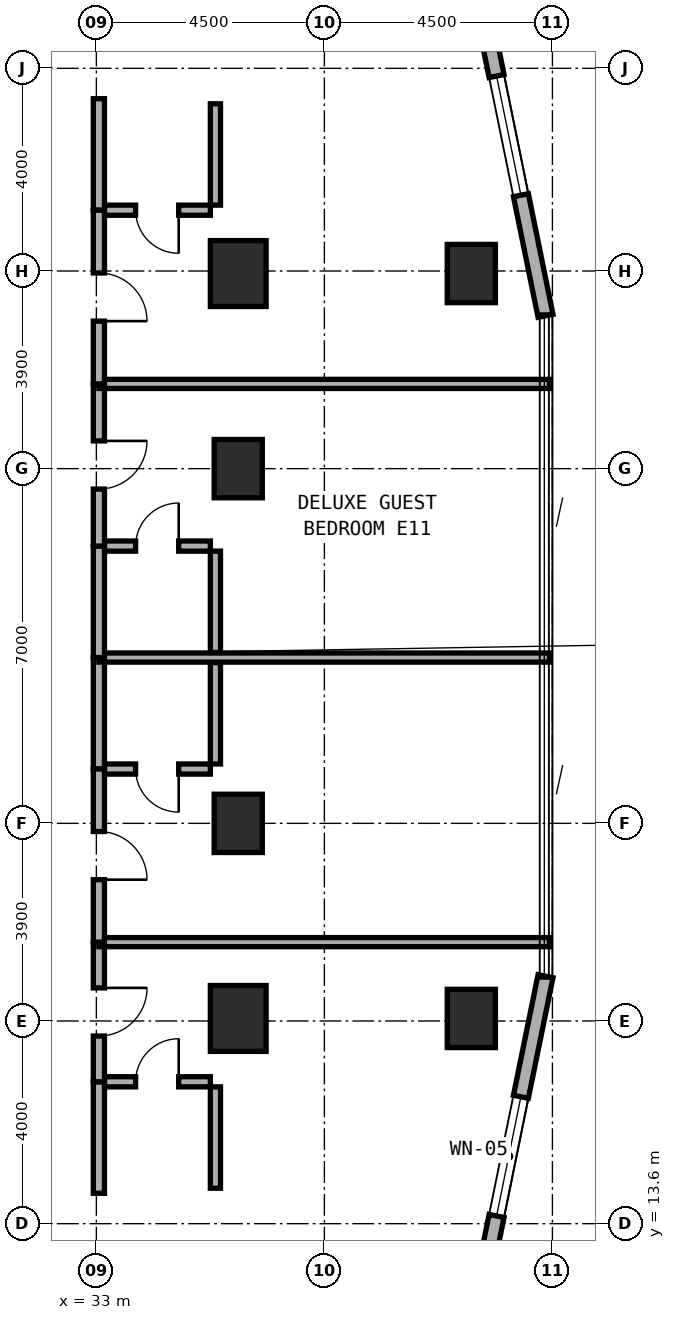
"""IFC4 building model, lengths in metres.
Left out: names, types, materials, properties, quantities, classifications, styles, units other than length and angle.
Written with IfcOpenShell. Run it as: python <this file> out.ifc"""

import sys

from ifc_helpers import new_model, si_unit, direction, frame, frame_2d, origin, origin_2d, place, context, subcontext, project, spatial, rectangle, extrude, element, fill, save


model = new_model("IFC4")
c1 = context("Model", 3, precision=1e-05, world=origin(), true_north=direction((0.0, 1.0)))
c2 = subcontext(c1, "Body", "Model", "MODEL_VIEW")
j1 = project(units=[si_unit("LENGTHUNIT", "METRE"), si_unit("PLANEANGLEUNIT", "RADIAN")], contexts=[c1])
p1 = place(None, origin())
s1 = spatial("IfcSite", under=j1, at=p1, CompositionType="ELEMENT")
p2 = place(p1, origin())
s2 = spatial("IfcBuilding", under=s1, at=p2, CompositionType="ELEMENT")
p3 = place(p2, frame((0.0, 0.0, 38.0)))
s3 = spatial("IfcBuildingStorey", under=s2, at=p3, CompositionType="ELEMENT", Elevation=38.0)
for number, where, z_axis, x_axis in (
    (1, (35.8, 21.5, 0.0), (0.0, 0.0, 1.0), (1.0, 0.0, 0.0)),
    (2, (35.8, 28.5, 0.0), (0.0, 0.0, 1.0), (1.0, 0.0, 0.0)),
):
    element("IfcColumn", number, at=place(p3, frame(where, z_axis=z_axis, x_axis=x_axis)), inside=s3, PredefinedType="COLUMN", context=c2, shape_type="SweptSolid", body=[
        extrude(rectangle(XDim=0.95, YDim=1.15, at=origin_2d()), origin(), (0.0, 0.0, 1.0), 3.5),
    ])
for number, where, z_axis, x_axis in (
    (3, (35.8, 17.65, 0.0), (0.0, 0.0, 1.0), (1.0, 0.0, 0.0)),
    (4, (35.8, 32.35, 0.0), (0.0, 0.0, 1.0), (1.0, 0.0, 0.0)),
):
    element("IfcColumn", number, at=place(p3, frame(where, z_axis=z_axis, x_axis=x_axis)), inside=s3, PredefinedType="COLUMN", context=c2, shape_type="SweptSolid", body=[
        extrude(rectangle(XDim=1.1, YDim=1.3, at=origin_2d()), origin(), (0.0, 0.0, 1.0), 3.5),
    ])
for number, where, z_axis, x_axis in (
    (5, (40.4, 17.65, 0.0), (0.0, 0.0, 1.0), (1.0, 0.0, 0.0)),
    (6, (40.4, 32.35, 0.0), (0.0, 0.0, 1.0), (1.0, 0.0, 0.0)),
):
    element("IfcColumn", number, at=place(p3, frame(where, z_axis=z_axis, x_axis=x_axis)), inside=s3, PredefinedType="COLUMN", context=c2, shape_type="SweptSolid", body=[
        extrude(rectangle(XDim=0.95, YDim=1.15, at=origin_2d()), origin(), (0.0, 0.0, 1.0), 3.5),
    ])
p4 = place(p3, frame((39.851, 8.622, 0.0), z_axis=(0.0, 0.0, 1.0), x_axis=(0.199990901713, 0.979797754249, 0.0)))
e7 = element("IfcWall", 7, at=p4, inside=s3, PredefinedType="STANDARD", context=c2, shape_type="SweptSolid", body=[
    extrude(rectangle(XDim=10.065, YDim=0.3, at=frame_2d((5.033, 0.0))), origin(), (0.0, 0.0, 1.0), 3.22),
])
p5 = place(p4, frame((0.378, 0.0, 0.85)))
e8 = element("IfcOpeningElement", 8, at=p5, cuts=e7, PredefinedType="OPENING", context=c2, shape_type="SweptSolid", body=[
    extrude(rectangle(XDim=1.8, YDim=1.5, at=frame_2d((0.9, 0.75))), frame((0.0, 0.16, 0.0), z_axis=(0.0, -1.0, 0.0), x_axis=(1.0, 0.0, 0.0)), (0.0, 0.0, 1.0), 0.32),
])
p6 = place(p4, frame((5.236, 0.0, 0.8)))
e9 = element("IfcOpeningElement", 9, at=p6, cuts=e7, PredefinedType="OPENING", context=c2, shape_type="SweptSolid", body=[
    extrude(rectangle(XDim=2.4, YDim=1.6, at=frame_2d((1.2, 0.8))), frame((0.0, 0.16, 0.0), z_axis=(0.0, -1.0, 0.0), x_axis=(1.0, 0.0, 0.0)), (0.0, 0.0, 1.0), 0.32),
])
p7 = place(p3, frame((41.864, 31.516, 0.0), z_axis=(0.0, 0.0, 1.0), x_axis=(-0.199990901713, 0.979797754249, 0.0)))
e10 = element("IfcWall", 10, at=p7, inside=s3, PredefinedType="STANDARD", context=c2, shape_type="SweptSolid", body=[
    extrude(rectangle(XDim=10.065, YDim=0.3, at=frame_2d((5.033, 0.0))), origin(), (0.0, 0.0, 1.0), 3.22),
])
p8 = place(p7, frame((2.429, 0.0, 0.8)))
e11 = element("IfcOpeningElement", 11, at=p8, cuts=e10, PredefinedType="OPENING", context=c2, shape_type="SweptSolid", body=[
    extrude(rectangle(XDim=2.4, YDim=1.6, at=frame_2d((1.2, 0.8))), frame((0.0, 0.16, 0.0), z_axis=(0.0, -1.0, 0.0), x_axis=(1.0, 0.0, 0.0)), (0.0, 0.0, 1.0), 0.32),
])
p9 = place(p7, frame((7.887, 0.0, 0.85)))
e12 = element("IfcOpeningElement", 12, at=p9, cuts=e10, PredefinedType="OPENING", context=c2, shape_type="SweptSolid", body=[
    extrude(rectangle(XDim=1.8, YDim=1.5, at=frame_2d((0.9, 0.75))), frame((0.0, 0.16, 0.0), z_axis=(0.0, -1.0, 0.0), x_axis=(1.0, 0.0, 0.0)), (0.0, 0.0, 1.0), 0.32),
])
p10 = place(p3, frame((33.15, 16.4, 0.0), z_axis=(0.0, 0.0, 1.0), x_axis=(1.0, 0.0, 0.0)))
e13 = element("IfcWall", 13, at=p10, inside=s3, PredefinedType="PLUMBINGWALL", context=c2, shape_type="SweptSolid", body=[
    extrude(rectangle(XDim=2.1, YDim=0.2, at=frame_2d((1.05, 0.0))), origin(), (0.0, 0.0, 1.0), 3.22),
])
p11 = place(p10, frame((0.625, 0.0, 0.0)))
e14 = element("IfcOpeningElement", 14, at=p11, cuts=e13, PredefinedType="OPENING", context=c2, shape_type="SweptSolid", body=[
    extrude(rectangle(XDim=0.85, YDim=2.1, at=frame_2d((0.425, 1.05))), frame((0.0, 0.11, 0.0), z_axis=(0.0, -1.0, 0.0), x_axis=(1.0, 0.0, 0.0)), (0.0, 0.0, 1.0), 0.22),
])
p12 = place(p3, frame((35.35, 14.3, 0.0), z_axis=(0.0, 0.0, 1.0), x_axis=(0.0, 1.0, 0.0)))
e15 = element("IfcWall", 15, at=p12, inside=s3, PredefinedType="PLUMBINGWALL", context=c2, shape_type="SweptSolid", body=[
    extrude(rectangle(XDim=2.0, YDim=0.2, at=frame_2d((1.0, 0.0))), origin(), (0.0, 0.0, 1.0), 2.745),
])
p13 = place(p3, frame((33.05, 14.2, 0.0), z_axis=(0.0, 0.0, 1.0), x_axis=(0.0, 1.0, 0.0)))
e16 = element("IfcWall", 16, at=p13, inside=s3, PredefinedType="SOLIDWALL", context=c2, shape_type="SweptSolid", body=[
    extrude(rectangle(XDim=2.2, YDim=0.22, at=frame_2d((1.1, 0.0))), origin(), (0.0, 0.0, 1.0), 3.22),
])
p14 = place(p3, frame((33.05, 16.4, 0.0), z_axis=(0.0, 0.0, 1.0), x_axis=(0.0, 1.0, 0.0)))
e17 = element("IfcWall", 17, at=p14, inside=s3, PredefinedType="SOLIDWALL", context=c2, shape_type="SweptSolid", body=[
    extrude(rectangle(XDim=2.756, YDim=0.22, at=frame_2d((1.378, 0.0))), origin(), (0.0, 0.0, 1.0), 2.395),
])
p15 = place(p14, frame((0.903, 0.0, 0.0)))
e18 = element("IfcOpeningElement", 18, at=p15, cuts=e17, PredefinedType="OPENING", context=c2, shape_type="SweptSolid", body=[
    extrude(rectangle(XDim=0.95, YDim=2.1, at=frame_2d((0.475, 1.05))), frame((0.0, 0.12, 0.0), z_axis=(0.0, -1.0, 0.0), x_axis=(1.0, 0.0, 0.0)), (0.0, 0.0, 1.0), 0.24),
])
p16 = place(p3, frame((33.05, 19.156, 0.0), z_axis=(0.0, 0.0, 1.0), x_axis=(1.0, 0.0, 0.0)))
e19 = element("IfcWall", 19, at=p16, inside=s3, PredefinedType="SOLIDWALL", context=c2, shape_type="SweptSolid", body=[
    extrude(rectangle(XDim=8.89, YDim=0.18, at=frame_2d((4.445, 0.0))), origin(), (0.0, 0.0, 1.0), 2.745),
])
p17 = place(p3, frame((33.15, 22.572, 0.0), z_axis=(0.0, 0.0, 1.0), x_axis=(1.0, 0.0, 0.0)))
e20 = element("IfcWall", 20, at=p17, inside=s3, PredefinedType="PLUMBINGWALL", context=c2, shape_type="SweptSolid", body=[
    extrude(rectangle(XDim=2.1, YDim=0.2, at=frame_2d((1.05, 0.0))), origin(), (0.0, 0.0, 1.0), 3.22),
])
p18 = place(p17, frame((0.625, 0.0, 0.0)))
e21 = element("IfcOpeningElement", 21, at=p18, cuts=e20, PredefinedType="OPENING", context=c2, shape_type="SweptSolid", body=[
    extrude(rectangle(XDim=0.85, YDim=2.1, at=frame_2d((0.425, 1.05))), frame((0.0, 0.11, 0.0), z_axis=(0.0, -1.0, 0.0), x_axis=(1.0, 0.0, 0.0)), (0.0, 0.0, 1.0), 0.22),
])
p19 = place(p3, frame((35.35, 22.672, 0.0), z_axis=(0.0, 0.0, 1.0), x_axis=(0.0, 1.0, 0.0)))
e22 = element("IfcWall", 22, at=p19, inside=s3, PredefinedType="PLUMBINGWALL", context=c2, shape_type="SweptSolid", body=[
    extrude(rectangle(XDim=2.0, YDim=0.2, at=frame_2d((1.0, 0.0))), origin(), (0.0, 0.0, 1.0), 3.22),
])
p20 = place(p3, frame((33.05, 22.572, 0.0), z_axis=(0.0, 0.0, 1.0), x_axis=(0.0, 1.0, 0.0)))
e23 = element("IfcWall", 23, at=p20, inside=s3, PredefinedType="SOLIDWALL", context=c2, shape_type="SweptSolid", body=[
    extrude(rectangle(XDim=2.2, YDim=0.22, at=frame_2d((1.1, 0.0))), origin(), (0.0, 0.0, 1.0), 3.22),
])
p21 = place(p3, frame((33.05, 19.156, 0.0), z_axis=(0.0, 0.0, 1.0), x_axis=(0.0, 1.0, 0.0)))
e24 = element("IfcWall", 24, at=p21, inside=s3, PredefinedType="SOLIDWALL", context=c2, shape_type="SweptSolid", body=[
    extrude(rectangle(XDim=3.416, YDim=0.22, at=frame_2d((1.708, 0.0))), origin(), (0.0, 0.0, 1.0), 2.395),
])
p22 = place(p21, frame((1.233, 0.0, 0.0)))
e25 = element("IfcOpeningElement", 25, at=p22, cuts=e24, PredefinedType="OPENING", context=c2, shape_type="SweptSolid", body=[
    extrude(rectangle(XDim=0.95, YDim=2.1, at=frame_2d((0.475, 1.05))), frame((0.0, 0.12, 0.0), z_axis=(0.0, -1.0, 0.0), x_axis=(1.0, 0.0, 0.0)), (0.0, 0.0, 1.0), 0.24),
])
p23 = place(p3, frame((33.05, 24.772, 0.0), z_axis=(0.0, 0.0, 1.0), x_axis=(1.0, 0.0, 0.0)))
e26 = element("IfcWall", 26, at=p23, inside=s3, PredefinedType="SOLIDWALL", context=c2, shape_type="SweptSolid", body=[
    extrude(rectangle(XDim=8.89, YDim=0.18, at=frame_2d((4.445, 0.0))), origin(), (0.0, 0.0, 1.0), 2.745),
])
p24 = place(p3, frame((33.15, 26.972, 0.0), z_axis=(0.0, 0.0, 1.0), x_axis=(1.0, 0.0, 0.0)))
e27 = element("IfcWall", 27, at=p24, inside=s3, PredefinedType="PLUMBINGWALL", context=c2, shape_type="SweptSolid", body=[
    extrude(rectangle(XDim=2.1, YDim=0.2, at=frame_2d((1.05, 0.0))), origin(), (0.0, 0.0, 1.0), 3.22),
])
p25 = place(p24, frame((0.625, 0.0, 0.0)))
e28 = element("IfcOpeningElement", 28, at=p25, cuts=e27, PredefinedType="OPENING", context=c2, shape_type="SweptSolid", body=[
    extrude(rectangle(XDim=0.85, YDim=2.1, at=frame_2d((0.425, 1.05))), frame((0.0, 0.11, 0.0), z_axis=(0.0, -1.0, 0.0), x_axis=(1.0, 0.0, 0.0)), (0.0, 0.0, 1.0), 0.22),
])
p26 = place(p3, frame((35.35, 24.872, 0.0), z_axis=(0.0, 0.0, 1.0), x_axis=(0.0, 1.0, 0.0)))
e29 = element("IfcWall", 29, at=p26, inside=s3, PredefinedType="PLUMBINGWALL", context=c2, shape_type="SweptSolid", body=[
    extrude(rectangle(XDim=2.0, YDim=0.2, at=frame_2d((1.0, 0.0))), origin(), (0.0, 0.0, 1.0), 3.22),
])
p27 = place(p3, frame((33.05, 24.772, 0.0), z_axis=(0.0, 0.0, 1.0), x_axis=(0.0, 1.0, 0.0)))
e30 = element("IfcWall", 30, at=p27, inside=s3, PredefinedType="SOLIDWALL", context=c2, shape_type="SweptSolid", body=[
    extrude(rectangle(XDim=2.2, YDim=0.22, at=frame_2d((1.1, 0.0))), origin(), (0.0, 0.0, 1.0), 3.22),
])
p28 = place(p3, frame((33.05, 26.972, 0.0), z_axis=(0.0, 0.0, 1.0), x_axis=(0.0, 1.0, 0.0)))
e31 = element("IfcWall", 31, at=p28, inside=s3, PredefinedType="SOLIDWALL", context=c2, shape_type="SweptSolid", body=[
    extrude(rectangle(XDim=3.2, YDim=0.22, at=frame_2d((1.6, 0.0))), origin(), (0.0, 0.0, 1.0), 2.395),
])
p29 = place(p28, frame((1.125, 0.0, 0.0)))
e32 = element("IfcOpeningElement", 32, at=p29, cuts=e31, PredefinedType="OPENING", context=c2, shape_type="SweptSolid", body=[
    extrude(rectangle(XDim=0.95, YDim=2.1, at=frame_2d((0.475, 1.05))), frame((0.0, 0.12, 0.0), z_axis=(0.0, -1.0, 0.0), x_axis=(1.0, 0.0, 0.0)), (0.0, 0.0, 1.0), 0.24),
])
p30 = place(p3, frame((33.05, 30.172, 0.0), z_axis=(0.0, 0.0, 1.0), x_axis=(1.0, 0.0, 0.0)))
e33 = element("IfcWall", 33, at=p30, inside=s3, PredefinedType="SOLIDWALL", context=c2, shape_type="SweptSolid", body=[
    extrude(rectangle(XDim=8.89, YDim=0.18, at=frame_2d((4.445, 0.0))), origin(), (0.0, 0.0, 1.0), 2.745),
])
p31 = place(p3, frame((33.15, 33.6, 0.0), z_axis=(0.0, 0.0, 1.0), x_axis=(1.0, 0.0, 0.0)))
e34 = element("IfcWall", 34, at=p31, inside=s3, PredefinedType="PLUMBINGWALL", context=c2, shape_type="SweptSolid", body=[
    extrude(rectangle(XDim=2.1, YDim=0.2, at=frame_2d((1.05, 0.0))), origin(), (0.0, 0.0, 1.0), 3.22),
])
p32 = place(p31, frame((0.625, 0.0, 0.0)))
e35 = element("IfcOpeningElement", 35, at=p32, cuts=e34, PredefinedType="OPENING", context=c2, shape_type="SweptSolid", body=[
    extrude(rectangle(XDim=0.85, YDim=2.1, at=frame_2d((0.425, 1.05))), frame((0.0, 0.11, 0.0), z_axis=(0.0, -1.0, 0.0), x_axis=(1.0, 0.0, 0.0)), (0.0, 0.0, 1.0), 0.22),
])
p33 = place(p3, frame((35.35, 33.7, 0.0), z_axis=(0.0, 0.0, 1.0), x_axis=(0.0, 1.0, 0.0)))
e36 = element("IfcWall", 36, at=p33, inside=s3, PredefinedType="PLUMBINGWALL", context=c2, shape_type="SweptSolid", body=[
    extrude(rectangle(XDim=2.0, YDim=0.2, at=frame_2d((1.0, 0.0))), origin(), (0.0, 0.0, 1.0), 2.745),
])
p34 = place(p3, frame((33.05, 33.6, 0.0), z_axis=(0.0, 0.0, 1.0), x_axis=(0.0, 1.0, 0.0)))
e37 = element("IfcWall", 37, at=p34, inside=s3, PredefinedType="SOLIDWALL", context=c2, shape_type="SweptSolid", body=[
    extrude(rectangle(XDim=2.2, YDim=0.22, at=frame_2d((1.1, 0.0))), origin(), (0.0, 0.0, 1.0), 3.22),
])
p35 = place(p3, frame((33.05, 30.172, 0.0), z_axis=(0.0, 0.0, 1.0), x_axis=(0.0, 1.0, 0.0)))
e38 = element("IfcWall", 38, at=p35, inside=s3, PredefinedType="SOLIDWALL", context=c2, shape_type="SweptSolid", body=[
    extrude(rectangle(XDim=3.428, YDim=0.22, at=frame_2d((1.714, 0.0))), origin(), (0.0, 0.0, 1.0), 2.395),
])
p36 = place(p35, frame((1.239, 0.0, 0.0)))
e39 = element("IfcOpeningElement", 39, at=p36, cuts=e38, PredefinedType="OPENING", context=c2, shape_type="SweptSolid", body=[
    extrude(rectangle(XDim=0.95, YDim=2.1, at=frame_2d((0.475, 1.05))), frame((0.0, 0.12, 0.0), z_axis=(0.0, -1.0, 0.0), x_axis=(1.0, 0.0, 0.0)), (0.0, 0.0, 1.0), 0.24),
])
p37 = place(p6, origin())
e40 = element("IfcWindow", 40, at=p37, inside=s3, PartitioningType="SINGLE_PANEL", PredefinedType="WINDOW", context=c2, shape_type="SweptSolid", body=[
    extrude(rectangle(XDim=2.4, YDim=1.6, at=frame_2d((1.2, 0.8))), frame((0.0, 0.03, 0.0), z_axis=(0.0, -1.0, 0.0), x_axis=(1.0, 0.0, 0.0)), (0.0, 0.0, 1.0), 0.06),
])
fill(e9, e40)
p38 = place(p8, origin())
e41 = element("IfcWindow", 41, at=p38, inside=s3, PartitioningType="SINGLE_PANEL", PredefinedType="WINDOW", context=c2, shape_type="SweptSolid", body=[
    extrude(rectangle(XDim=2.4, YDim=1.6, at=frame_2d((1.2, 0.8))), frame((0.0, 0.03, 0.0), z_axis=(0.0, -1.0, 0.0), x_axis=(1.0, 0.0, 0.0)), (0.0, 0.0, 1.0), 0.06),
])
fill(e11, e41)
p39 = place(p11, origin())
e42 = element("IfcDoor", 42, at=p39, inside=s3, OperationType="SINGLE_SWING_RIGHT", PredefinedType="DOOR", context=c2, shape_type="SweptSolid", body=[
    extrude(rectangle(XDim=0.85, YDim=2.1, at=frame_2d((0.425, 1.05))), frame((0.0, 0.025, 0.0), z_axis=(0.0, -1.0, 0.0), x_axis=(1.0, 0.0, 0.0)), (0.0, 0.0, 1.0), 0.05),
])
fill(e14, e42)
p40 = place(p15, frame((0.95, 0.0, 0.0), z_axis=(0.0, 0.0, 1.0), x_axis=(-1.0, 0.0, 0.0)))
e43 = element("IfcDoor", 43, at=p40, inside=s3, OperationType="SINGLE_SWING_LEFT", PredefinedType="DOOR", context=c2, shape_type="SweptSolid", body=[
    extrude(rectangle(XDim=0.95, YDim=2.1, at=frame_2d((0.475, 1.05))), frame((0.0, 0.025, 0.0), z_axis=(0.0, -1.0, 0.0), x_axis=(1.0, 0.0, 0.0)), (0.0, 0.0, 1.0), 0.05),
])
fill(e18, e43)
p41 = place(p18, frame((0.85, 0.0, 0.0), z_axis=(0.0, 0.0, 1.0), x_axis=(-1.0, 0.0, 0.0)))
e44 = element("IfcDoor", 44, at=p41, inside=s3, OperationType="SINGLE_SWING_LEFT", PredefinedType="DOOR", context=c2, shape_type="SweptSolid", body=[
    extrude(rectangle(XDim=0.85, YDim=2.1, at=frame_2d((0.425, 1.05))), frame((0.0, 0.025, 0.0), z_axis=(0.0, -1.0, 0.0), x_axis=(1.0, 0.0, 0.0)), (0.0, 0.0, 1.0), 0.05),
])
fill(e21, e44)
p42 = place(p22, frame((0.95, 0.0, 0.0), z_axis=(0.0, 0.0, 1.0), x_axis=(-1.0, 0.0, 0.0)))
e45 = element("IfcDoor", 45, at=p42, inside=s3, OperationType="SINGLE_SWING_RIGHT", PredefinedType="DOOR", context=c2, shape_type="SweptSolid", body=[
    extrude(rectangle(XDim=0.95, YDim=2.1, at=frame_2d((0.475, 1.05))), frame((0.0, 0.025, 0.0), z_axis=(0.0, -1.0, 0.0), x_axis=(1.0, 0.0, 0.0)), (0.0, 0.0, 1.0), 0.05),
])
fill(e25, e45)
p43 = place(p25, origin())
e46 = element("IfcDoor", 46, at=p43, inside=s3, OperationType="SINGLE_SWING_RIGHT", PredefinedType="DOOR", context=c2, shape_type="SweptSolid", body=[
    extrude(rectangle(XDim=0.85, YDim=2.1, at=frame_2d((0.425, 1.05))), frame((0.0, 0.025, 0.0), z_axis=(0.0, -1.0, 0.0), x_axis=(1.0, 0.0, 0.0)), (0.0, 0.0, 1.0), 0.05),
])
fill(e28, e46)
p44 = place(p29, frame((0.95, 0.0, 0.0), z_axis=(0.0, 0.0, 1.0), x_axis=(-1.0, 0.0, 0.0)))
e47 = element("IfcDoor", 47, at=p44, inside=s3, OperationType="SINGLE_SWING_LEFT", PredefinedType="DOOR", context=c2, shape_type="SweptSolid", body=[
    extrude(rectangle(XDim=0.95, YDim=2.1, at=frame_2d((0.475, 1.05))), frame((0.0, 0.025, 0.0), z_axis=(0.0, -1.0, 0.0), x_axis=(1.0, 0.0, 0.0)), (0.0, 0.0, 1.0), 0.05),
])
fill(e32, e47)
p45 = place(p32, frame((0.85, 0.0, 0.0), z_axis=(0.0, 0.0, 1.0), x_axis=(-1.0, 0.0, 0.0)))
e48 = element("IfcDoor", 48, at=p45, inside=s3, OperationType="SINGLE_SWING_LEFT", PredefinedType="DOOR", context=c2, shape_type="SweptSolid", body=[
    extrude(rectangle(XDim=0.85, YDim=2.1, at=frame_2d((0.425, 1.05))), frame((0.0, 0.025, 0.0), z_axis=(0.0, -1.0, 0.0), x_axis=(1.0, 0.0, 0.0)), (0.0, 0.0, 1.0), 0.05),
])
fill(e35, e48)
p46 = place(p36, frame((0.95, 0.0, 0.0), z_axis=(0.0, 0.0, 1.0), x_axis=(-1.0, 0.0, 0.0)))
e49 = element("IfcDoor", 49, at=p46, inside=s3, OperationType="SINGLE_SWING_RIGHT", PredefinedType="DOOR", context=c2, shape_type="SweptSolid", body=[
    extrude(rectangle(XDim=0.95, YDim=2.1, at=frame_2d((0.475, 1.05))), frame((0.0, 0.025, 0.0), z_axis=(0.0, -1.0, 0.0), x_axis=(1.0, 0.0, 0.0)), (0.0, 0.0, 1.0), 0.05),
])
fill(e39, e49)
save(model, sys.argv[1])
